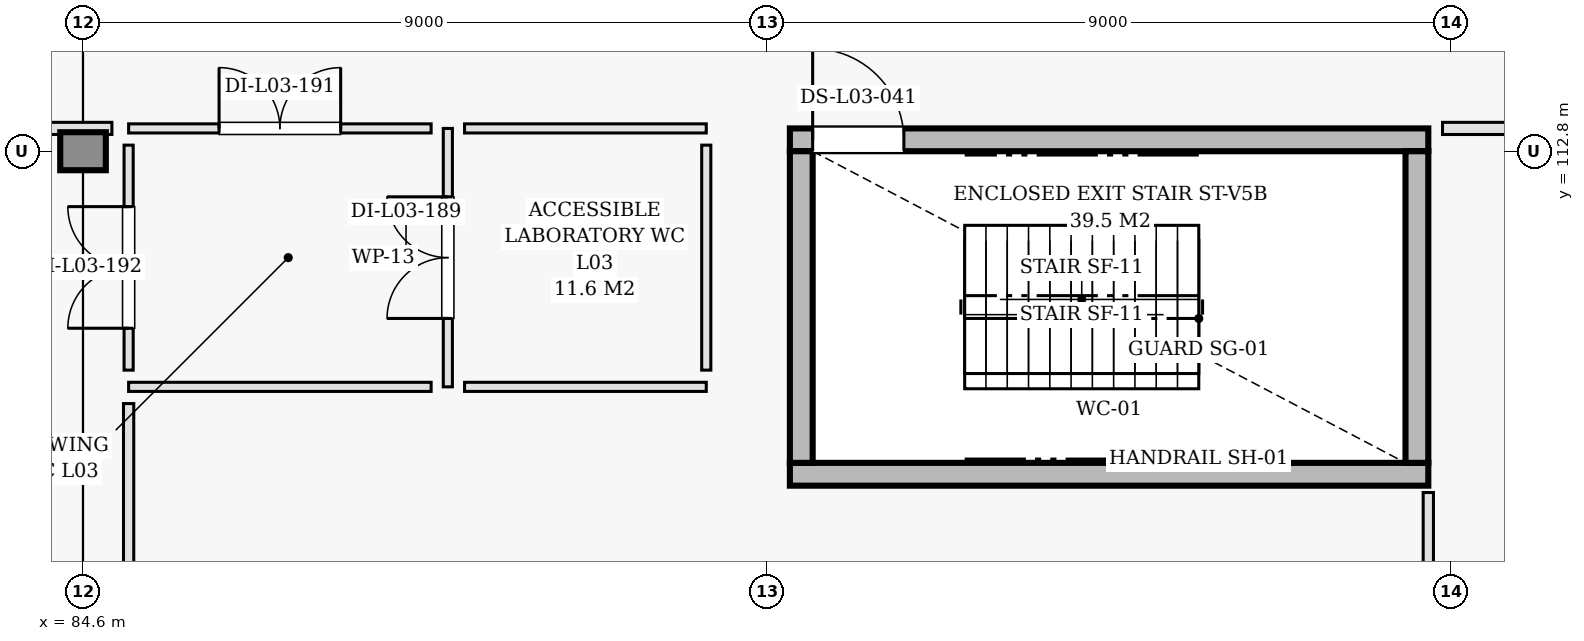
"""IFC4 building model, lengths in metres.
Left out: names, types, materials, properties, quantities, classifications, styles, units other than length and angle.
Written with IfcOpenShell. Run it as: python <this file> out.ifc"""

import sys

from ifc_helpers import new_model, si_unit, direction, frame, frame_2d, origin, origin_2d, place, context, subcontext, project, spatial, rectangle, extrude, element, fill, save


model = new_model("IFC4")
c1 = context("Model", 3, precision=1e-05, world=origin(), true_north=direction((0.0, 1.0)))
c2 = subcontext(c1, "Body", "Model", "MODEL_VIEW")
j1 = project(units=[si_unit("LENGTHUNIT", "METRE"), si_unit("PLANEANGLEUNIT", "RADIAN")], contexts=[c1])
p1 = place(None, origin())
s1 = spatial("IfcSite", under=j1, at=p1, CompositionType="ELEMENT")
p2 = place(p1, origin())
s2 = spatial("IfcBuilding", under=s1, at=p2, CompositionType="ELEMENT")
p3 = place(p2, frame((0.0, 0.0, 13.8)))
s3 = spatial("IfcBuildingStorey", under=s2, at=p3, CompositionType="ELEMENT", Elevation=13.8)
p4 = place(p3, frame((84.6, 112.8, 0.0), z_axis=(0.0, 0.0, 1.0), x_axis=(1.0, 0.0, 0.0)))
e1 = element("IfcColumn", 1, at=p4, inside=s3, PredefinedType="COLUMN", context=c2, shape_type="SweptSolid", body=[
    extrude(rectangle(XDim=0.5, YDim=0.5, at=origin_2d()), origin(), (0.0, 0.0, 1.0), 4.2),
])
p5 = place(p3, frame((93.9, 108.55, 0.0), z_axis=(0.0, 0.0, 1.0), x_axis=(1.0, 0.0, 0.0)))
e2 = element("IfcWall", 2, at=p5, inside=s3, PredefinedType="SHEAR", context=c2, shape_type="SweptSolid", body=[
    extrude(rectangle(XDim=8.4, YDim=0.3, at=frame_2d((4.2, 0.0))), origin(), (0.0, 0.0, 1.0), 3.96),
])
p6 = place(p3, frame((93.9, 112.95, 0.0), z_axis=(0.0, 0.0, 1.0), x_axis=(1.0, 0.0, 0.0)))
e3 = element("IfcWall", 3, at=p6, inside=s3, PredefinedType="SHEAR", context=c2, shape_type="SweptSolid", body=[
    extrude(rectangle(XDim=8.4, YDim=0.3, at=frame_2d((4.2, 0.0))), origin(), (0.0, 0.0, 1.0), 3.96),
])
p7 = place(p6, frame((0.3, 0.0, 0.0)))
e4 = element("IfcOpeningElement", 4, at=p7, cuts=e3, PredefinedType="OPENING", context=c2, shape_type="SweptSolid", body=[
    extrude(rectangle(XDim=1.2, YDim=2.15, at=frame_2d((0.6, 1.075))), frame((0.0, 0.16, 0.0), z_axis=(0.0, -1.0, 0.0), x_axis=(1.0, 0.0, 0.0)), (0.0, 0.0, 1.0), 0.32),
])
for number, where, z_axis, x_axis in (
    (5, (94.05, 108.7, 0.0), (0.0, 0.0, 1.0), (0.0, 1.0, 0.0)),
    (6, (102.15, 108.7, 0.0), (0.0, 0.0, 1.0), (0.0, 1.0, 0.0)),
):
    element("IfcWall", number, at=place(p3, frame(where, z_axis=z_axis, x_axis=x_axis)), inside=s3, PredefinedType="SHEAR", context=c2, shape_type="SweptSolid", body=[
        extrude(rectangle(XDim=4.1, YDim=0.3, at=frame_2d((2.05, 0.0))), origin(), (0.0, 0.0, 1.0), 3.96),
    ])
p8 = place(p3, frame((89.4, 109.7, 0.0), z_axis=(0.0, 0.0, 1.0), x_axis=(0.0, 1.0, 0.0)))
e7 = element("IfcWall", 7, at=p8, inside=s3, PredefinedType="PARTITIONING", context=c2, shape_type="SweptSolid", body=[
    extrude(rectangle(XDim=3.4, YDim=0.12, at=frame_2d((1.7, 0.0))), origin(), (0.0, 0.0, 1.0), 3.465),
])
p9 = place(p8, frame((0.9, 0.0, 0.0)))
e8 = element("IfcOpeningElement", 8, at=p9, cuts=e7, PredefinedType="OPENING", context=c2, shape_type="SweptSolid", body=[
    extrude(rectangle(XDim=1.6, YDim=2.2, at=frame_2d((0.8, 1.1))), frame((0.0, 0.07, 0.0), z_axis=(0.0, -1.0, 0.0), x_axis=(1.0, 0.0, 0.0)), (0.0, 0.0, 1.0), 0.14),
])
p10 = place(p3, frame((89.62, 109.7, 0.0), z_axis=(0.0, 0.0, 1.0), x_axis=(1.0, 0.0, 0.0)))
e9 = element("IfcWall", 9, at=p10, inside=s3, PredefinedType="PARTITIONING", context=c2, shape_type="SweptSolid", body=[
    extrude(rectangle(XDim=3.18, YDim=0.12, at=frame_2d((1.59, 0.0))), origin(), (0.0, 0.0, 1.0), 3.465),
])
p11 = place(p3, frame((89.62, 113.1, 0.0), z_axis=(0.0, 0.0, 1.0), x_axis=(1.0, 0.0, 0.0)))
e10 = element("IfcWall", 10, at=p11, inside=s3, PredefinedType="PARTITIONING", context=c2, shape_type="SweptSolid", body=[
    extrude(rectangle(XDim=3.18, YDim=0.12, at=frame_2d((1.59, 0.0))), origin(), (0.0, 0.0, 1.0), 3.96),
])
p12 = place(p3, frame((92.8, 109.92, 0.0), z_axis=(0.0, 0.0, 1.0), x_axis=(0.0, 1.0, 0.0)))
e11 = element("IfcWall", 11, at=p12, inside=s3, PredefinedType="PARTITIONING", context=c2, shape_type="SweptSolid", body=[
    extrude(rectangle(XDim=2.96, YDim=0.12, at=frame_2d((1.48, 0.0))), origin(), (0.0, 0.0, 1.0), 3.96),
])
p13 = place(p3, frame((85.2, 113.1, 0.0), z_axis=(0.0, 0.0, 1.0), x_axis=(1.0, 0.0, 0.0)))
e12 = element("IfcWall", 12, at=p13, inside=s3, PredefinedType="PARTITIONING", context=c2, shape_type="SweptSolid", body=[
    extrude(rectangle(XDim=3.98, YDim=0.12, at=frame_2d((1.99, 0.0))), origin(), (0.0, 0.0, 1.0), 3.96),
])
p14 = place(p13, frame((1.19, 0.0, 0.0)))
e13 = element("IfcOpeningElement", 13, at=p14, cuts=e12, PredefinedType="OPENING", context=c2, shape_type="SweptSolid", body=[
    extrude(rectangle(XDim=1.6, YDim=2.2, at=frame_2d((0.8, 1.1))), frame((0.0, 0.07, 0.0), z_axis=(0.0, -1.0, 0.0), x_axis=(1.0, 0.0, 0.0)), (0.0, 0.0, 1.0), 0.14),
])
p15 = place(p3, frame((85.2, 109.7, 0.0), z_axis=(0.0, 0.0, 1.0), x_axis=(1.0, 0.0, 0.0)))
e14 = element("IfcWall", 14, at=p15, inside=s3, PredefinedType="PARTITIONING", context=c2, shape_type="SweptSolid", body=[
    extrude(rectangle(XDim=3.98, YDim=0.12, at=frame_2d((1.99, 0.0))), origin(), (0.0, 0.0, 1.0), 3.465),
])
p16 = place(p3, frame((85.2, 109.92, 0.0), z_axis=(0.0, 0.0, 1.0), x_axis=(0.0, 1.0, 0.0)))
e15 = element("IfcWall", 15, at=p16, inside=s3, PredefinedType="PARTITIONING", context=c2, shape_type="SweptSolid", body=[
    extrude(rectangle(XDim=2.96, YDim=0.12, at=frame_2d((1.48, 0.0))), origin(), (0.0, 0.0, 1.0), 3.96),
])
p17 = place(p16, frame((0.551, 0.0, 0.0)))
e16 = element("IfcOpeningElement", 16, at=p17, cuts=e15, PredefinedType="OPENING", context=c2, shape_type="SweptSolid", body=[
    extrude(rectangle(XDim=1.6, YDim=2.2, at=frame_2d((0.8, 1.1))), frame((0.0, 0.07, 0.0), z_axis=(0.0, -1.0, 0.0), x_axis=(1.0, 0.0, 0.0)), (0.0, 0.0, 1.0), 0.14),
])
p18 = place(p3, frame((102.487, 113.1, 0.0), z_axis=(0.0, 0.0, 1.0), x_axis=(1.0, 0.0, 0.0)))
e17 = element("IfcWall", 17, at=p18, inside=s3, PredefinedType="PARTITIONING", context=c2, shape_type="SweptSolid", body=[
    extrude(rectangle(XDim=12.967, YDim=0.16, at=frame_2d((6.483, 0.0))), origin(), (0.0, 0.0, 1.0), 3.045),
])
p19 = place(p3, frame((102.3, 103.855, 0.0), z_axis=(0.0, 0.0, 1.0), x_axis=(0.0, 1.0, 0.0)))
e18 = element("IfcWall", 18, at=p19, inside=s3, PredefinedType="PARTITIONING", context=c2, shape_type="SweptSolid", body=[
    extrude(rectangle(XDim=4.455, YDim=0.135, at=frame_2d((2.228, 0.0))), origin(), (0.0, 0.0, 1.0), 3.045),
])
p20 = place(p3, frame((80.146, 113.1, 0.0), z_axis=(0.0, 0.0, 1.0), x_axis=(1.0, 0.0, 0.0)))
e19 = element("IfcWall", 19, at=p20, inside=s3, PredefinedType="PARTITIONING", context=c2, shape_type="SweptSolid", body=[
    extrude(rectangle(XDim=4.834, YDim=0.16, at=frame_2d((2.417, 0.0))), origin(), (0.0, 0.0, 1.0), 3.295),
])
p21 = place(p3, frame((85.2, 103.855, 0.0), z_axis=(0.0, 0.0, 1.0), x_axis=(0.0, 1.0, 0.0)))
e20 = element("IfcWall", 20, at=p21, inside=s3, PredefinedType="PARTITIONING", context=c2, shape_type="SweptSolid", body=[
    extrude(rectangle(XDim=5.625, YDim=0.135, at=frame_2d((2.812, 0.0))), origin(), (0.0, 0.0, 1.0), 3.195),
])
p22 = place(p7, origin())
e21 = element("IfcDoor", 21, at=p22, inside=s3, OperationType="SINGLE_SWING_LEFT", PredefinedType="DOOR", context=c2, shape_type="SweptSolid", body=[
    extrude(rectangle(XDim=1.2, YDim=2.15, at=frame_2d((0.6, 1.075))), frame((0.0, 0.025, 0.0), z_axis=(0.0, -1.0, 0.0), x_axis=(1.0, 0.0, 0.0)), (0.0, 0.0, 1.0), 0.05),
])
fill(e4, e21)
p23 = place(p9, origin())
e22 = element("IfcDoor", 22, at=p23, inside=s3, OperationType="DOUBLE_DOOR_SINGLE_SWING", PredefinedType="DOOR", context=c2, shape_type="SweptSolid", body=[
    extrude(rectangle(XDim=1.6, YDim=2.2, at=frame_2d((0.8, 1.1))), frame((0.0, 0.025, 0.0), z_axis=(0.0, -1.0, 0.0), x_axis=(1.0, 0.0, 0.0)), (0.0, 0.0, 1.0), 0.05),
])
fill(e8, e22)
p24 = place(p14, origin())
e23 = element("IfcDoor", 23, at=p24, inside=s3, OperationType="DOUBLE_DOOR_SINGLE_SWING", PredefinedType="DOOR", context=c2, shape_type="SweptSolid", body=[
    extrude(rectangle(XDim=1.6, YDim=2.2, at=frame_2d((0.8, 1.1))), frame((0.0, 0.025, 0.0), z_axis=(0.0, -1.0, 0.0), x_axis=(1.0, 0.0, 0.0)), (0.0, 0.0, 1.0), 0.05),
])
fill(e13, e23)
p25 = place(p17, origin())
e24 = element("IfcDoor", 24, at=p25, inside=s3, OperationType="DOUBLE_DOOR_SINGLE_SWING", PredefinedType="DOOR", context=c2, shape_type="SweptSolid", body=[
    extrude(rectangle(XDim=1.6, YDim=2.2, at=frame_2d((0.8, 1.1))), frame((0.0, 0.025, 0.0), z_axis=(0.0, -1.0, 0.0), x_axis=(1.0, 0.0, 0.0)), (0.0, 0.0, 1.0), 0.05),
])
fill(e16, e24)
save(model, sys.argv[1])
